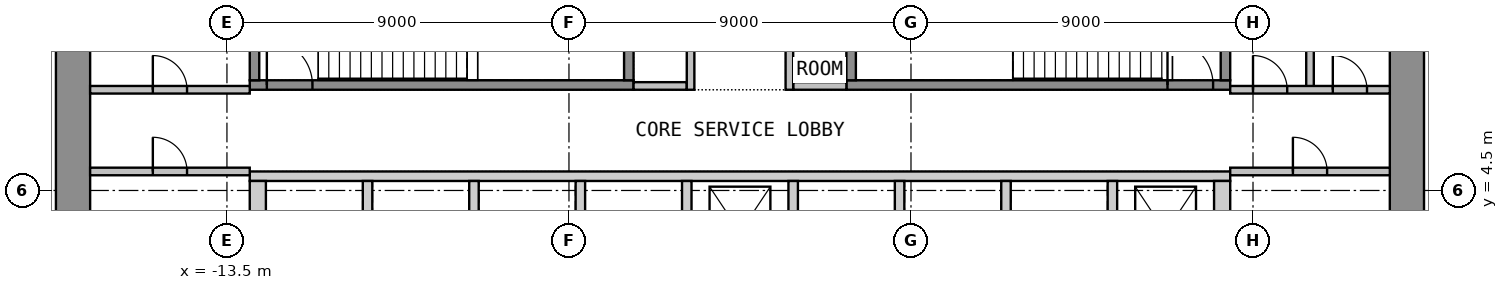
"""IFC4 building model, lengths in metres.
Left out: names, types, materials, properties, quantities, classifications, styles, units other than length and angle.
Written with IfcOpenShell. Run it as: python <this file> out.ifc"""

import sys

from ifc_helpers import new_model, si_unit, direction, frame, frame_2d, origin, place, context, subcontext, project, spatial, polyline, rectangle, outline, extrude, element, fill, save


model = new_model("IFC4")
c1 = context("Model", 3, precision=1e-05, world=origin(), true_north=direction((0.0, 1.0)))
c2 = subcontext(c1, "Body", "Model", "MODEL_VIEW")
j1 = project(units=[si_unit("LENGTHUNIT", "METRE"), si_unit("PLANEANGLEUNIT", "RADIAN")], contexts=[c1])
p1 = place(None, origin())
s1 = spatial("IfcSite", under=j1, at=p1, CompositionType="ELEMENT")
p2 = place(p1, origin())
s2 = spatial("IfcBuilding", under=s1, at=p2, CompositionType="ELEMENT")
p3 = place(p2, frame((0.0, 0.0, -5.0)))
s3 = spatial("IfcBuildingStorey", under=s2, at=p3, CompositionType="ELEMENT", Elevation=-5.0)
p4 = place(p3, frame((-17.55, -12.6, 0.0), z_axis=(0.0, 0.0, 1.0), x_axis=(0.0, 1.0, 0.0)))
e1 = element("IfcWall", 1, at=p4, inside=s3, PredefinedType="SHEAR", context=c2, shape_type="SweptSolid", body=[
    extrude(rectangle(XDim=25.2, YDim=0.9, at=frame_2d((12.6, 0.0))), origin(), (0.0, 0.0, 1.0), 4.55),
])
p5 = place(p4, frame((11.4, 0.0, 0.0)))
e2 = element("IfcOpeningElement", 2, at=p5, cuts=e1, PredefinedType="OPENING", context=c2, shape_type="SweptSolid", body=[
    extrude(rectangle(XDim=2.4, YDim=2.1, at=frame_2d((1.2, 1.05))), frame((0.0, 0.46, 0.0), z_axis=(0.0, -1.0, 0.0), x_axis=(1.0, 0.0, 0.0)), (0.0, 0.0, 1.0), 0.92),
])
p6 = place(p3, frame((17.55, -12.6, 0.0), z_axis=(0.0, 0.0, 1.0), x_axis=(0.0, 1.0, 0.0)))
e3 = element("IfcWall", 3, at=p6, inside=s3, PredefinedType="SHEAR", context=c2, shape_type="SweptSolid", body=[
    extrude(rectangle(XDim=25.2, YDim=0.9, at=frame_2d((12.6, 0.0))), origin(), (0.0, 0.0, 1.0), 4.55),
])
p7 = place(p6, frame((11.4, 0.0, 0.0)))
e4 = element("IfcOpeningElement", 4, at=p7, cuts=e3, PredefinedType="OPENING", context=c2, shape_type="SweptSolid", body=[
    extrude(rectangle(XDim=2.4, YDim=2.1, at=frame_2d((1.2, 1.05))), frame((0.0, 0.46, 0.0), z_axis=(0.0, -1.0, 0.0), x_axis=(1.0, 0.0, 0.0)), (0.0, 0.0, 1.0), 0.92),
])
p8 = place(p3, origin())
e5 = element("IfcWall", 5, at=p8, inside=s3, PredefinedType="SHEAR", context=c2, shape_type="SweptSolid", body=[
    extrude(outline(polyline([(-12.9, 4.75), (12.9, 4.75), (12.9, 5.0), (-12.9, 5.0), (-12.9, 4.75)])), origin(), (0.0, 0.0, 1.0), 4.55),
])
p9 = place(p3, origin())
e6 = element("IfcWall", 6, at=p9, inside=s3, PredefinedType="SHEAR", context=c2, shape_type="SweptSolid", body=[
    extrude(outline(polyline([(-12.9, 2.05), (-12.475, 2.05), (-12.475, 4.75), (-12.9, 4.75), (-12.9, 2.05)])), origin(), (0.0, 0.0, 1.0), 4.55),
])
p10 = place(p3, origin())
e7 = element("IfcWall", 7, at=p10, inside=s3, PredefinedType="SHEAR", context=c2, shape_type="SweptSolid", body=[
    extrude(outline(polyline([(-9.925, 2.05), (-9.675, 2.05), (-9.675, 4.75), (-9.925, 4.75), (-9.925, 2.05)])), origin(), (0.0, 0.0, 1.0), 4.55),
])
p11 = place(p3, origin())
e8 = element("IfcWall", 8, at=p11, inside=s3, PredefinedType="SHEAR", context=c2, shape_type="SweptSolid", body=[
    extrude(outline(polyline([(-7.125, 2.05), (-6.875, 2.05), (-6.875, 4.75), (-7.125, 4.75), (-7.125, 2.05)])), origin(), (0.0, 0.0, 1.0), 4.55),
])
p12 = place(p3, origin())
e9 = element("IfcWall", 9, at=p12, inside=s3, PredefinedType="SHEAR", context=c2, shape_type="SweptSolid", body=[
    extrude(outline(polyline([(-4.325, 2.05), (-4.075, 2.05), (-4.075, 4.75), (-4.325, 4.75), (-4.325, 2.05)])), origin(), (0.0, 0.0, 1.0), 4.55),
])
p13 = place(p3, origin())
e10 = element("IfcWall", 10, at=p13, inside=s3, PredefinedType="SHEAR", context=c2, shape_type="SweptSolid", body=[
    extrude(outline(polyline([(-1.525, 2.05), (-1.275, 2.05), (-1.275, 4.75), (-1.525, 4.75), (-1.525, 2.05)])), origin(), (0.0, 0.0, 1.0), 4.55),
])
p14 = place(p3, origin())
e11 = element("IfcWall", 11, at=p14, inside=s3, PredefinedType="SHEAR", context=c2, shape_type="SweptSolid", body=[
    extrude(outline(polyline([(1.275, 2.05), (1.525, 2.05), (1.525, 4.75), (1.275, 4.75), (1.275, 2.05)])), origin(), (0.0, 0.0, 1.0), 4.55),
])
p15 = place(p3, origin())
e12 = element("IfcWall", 12, at=p15, inside=s3, PredefinedType="SHEAR", context=c2, shape_type="SweptSolid", body=[
    extrude(outline(polyline([(4.075, 2.05), (4.325, 2.05), (4.325, 4.75), (4.075, 4.75), (4.075, 2.05)])), origin(), (0.0, 0.0, 1.0), 4.55),
])
p16 = place(p3, origin())
e13 = element("IfcWall", 13, at=p16, inside=s3, PredefinedType="SHEAR", context=c2, shape_type="SweptSolid", body=[
    extrude(outline(polyline([(6.875, 2.05), (7.125, 2.05), (7.125, 4.75), (6.875, 4.75), (6.875, 2.05)])), origin(), (0.0, 0.0, 1.0), 4.55),
])
p17 = place(p3, origin())
e14 = element("IfcWall", 14, at=p17, inside=s3, PredefinedType="SHEAR", context=c2, shape_type="SweptSolid", body=[
    extrude(outline(polyline([(9.675, 2.05), (9.925, 2.05), (9.925, 4.75), (9.675, 4.75), (9.675, 2.05)])), origin(), (0.0, 0.0, 1.0), 4.55),
])
p18 = place(p3, origin())
e15 = element("IfcWall", 15, at=p18, inside=s3, PredefinedType="SHEAR", context=c2, shape_type="SweptSolid", body=[
    extrude(outline(polyline([(12.475, 2.05), (12.9, 2.05), (12.9, 4.75), (12.475, 4.75), (12.475, 2.05)])), origin(), (0.0, 0.0, 1.0), 4.55),
])
p19 = place(p3, frame((-12.9, 7.275, 0.0), z_axis=(0.0, 0.0, 1.0), x_axis=(1.0, 0.0, 0.0)))
e16 = element("IfcWall", 16, at=p19, inside=s3, PredefinedType="SHEAR", context=c2, shape_type="SweptSolid", body=[
    extrude(rectangle(XDim=10.1, YDim=0.25, at=frame_2d((5.05, 0.0))), origin(), (0.0, 0.0, 1.0), 4.55),
])
p20 = place(p19, frame((0.45, 0.0, 0.0)))
e17 = element("IfcOpeningElement", 17, at=p20, cuts=e16, PredefinedType="OPENING", context=c2, shape_type="SweptSolid", body=[
    extrude(rectangle(XDim=1.2, YDim=2.1, at=frame_2d((0.6, 1.05))), frame((0.0, 0.135, 0.0), z_axis=(0.0, -1.0, 0.0), x_axis=(1.0, 0.0, 0.0)), (0.0, 0.0, 1.0), 0.27),
])
for number, where, z_axis, x_axis in (
    (18, (-12.775, 7.4, 0.0), (0.0, 0.0, 1.0), (0.0, 1.0, 0.0)),
    (19, (-2.925, 7.4, 0.0), (0.0, 0.0, 1.0), (0.0, 1.0, 0.0)),
):
    element("IfcWall", number, at=place(p3, frame(where, z_axis=z_axis, x_axis=x_axis)), inside=s3, PredefinedType="SHEAR", context=c2, shape_type="SweptSolid", body=[
        extrude(rectangle(XDim=3.25, YDim=0.25, at=frame_2d((1.625, 0.0))), origin(), (0.0, 0.0, 1.0), 4.55),
    ])
p21 = place(p3, frame((2.8, 7.275, 0.0), z_axis=(0.0, 0.0, 1.0), x_axis=(1.0, 0.0, 0.0)))
e20 = element("IfcWall", 20, at=p21, inside=s3, PredefinedType="SHEAR", context=c2, shape_type="SweptSolid", body=[
    extrude(rectangle(XDim=10.1, YDim=0.25, at=frame_2d((5.05, 0.0))), origin(), (0.0, 0.0, 1.0), 4.55),
])
p22 = place(p21, frame((8.45, 0.0, 0.0)))
e21 = element("IfcOpeningElement", 21, at=p22, cuts=e20, PredefinedType="OPENING", context=c2, shape_type="SweptSolid", body=[
    extrude(rectangle(XDim=1.2, YDim=2.1, at=frame_2d((0.6, 1.05))), frame((0.0, 0.135, 0.0), z_axis=(0.0, -1.0, 0.0), x_axis=(1.0, 0.0, 0.0)), (0.0, 0.0, 1.0), 0.27),
])
for number, where, z_axis, x_axis in (
    (22, (2.925, 7.4, 0.0), (0.0, 0.0, 1.0), (0.0, 1.0, 0.0)),
    (23, (12.775, 7.4, 0.0), (0.0, 0.0, 1.0), (0.0, 1.0, 0.0)),
):
    element("IfcWall", number, at=place(p3, frame(where, z_axis=z_axis, x_axis=x_axis)), inside=s3, PredefinedType="SHEAR", context=c2, shape_type="SweptSolid", body=[
        extrude(rectangle(XDim=3.25, YDim=0.25, at=frame_2d((1.625, 0.0))), origin(), (0.0, 0.0, 1.0), 4.55),
    ])
for number, where, z_axis, x_axis in (
    (24, (-2.8, 7.25, 0.0), (0.0, 0.0, 1.0), (1.0, 0.0, 0.0)),
    (25, (1.4, 7.25, 0.0), (0.0, 0.0, 1.0), (1.0, 0.0, 0.0)),
):
    element("IfcWall", number, at=place(p3, frame(where, z_axis=z_axis, x_axis=x_axis)), inside=s3, PredefinedType="PARTITIONING", context=c2, shape_type="SweptSolid", body=[
        extrude(rectangle(XDim=1.4, YDim=0.2, at=frame_2d((0.7, 0.0))), origin(), (0.0, 0.0, 1.0), 4.55),
    ])
p23 = place(p3, frame((-1.3, 7.15, 0.0), z_axis=(0.0, 0.0, 1.0), x_axis=(0.0, 1.0, 0.0)))
e26 = element("IfcWall", 26, at=p23, inside=s3, PredefinedType="PARTITIONING", context=c2, shape_type="SweptSolid", body=[
    extrude(rectangle(XDim=5.45, YDim=0.2, at=frame_2d((2.725, 0.0))), origin(), (0.0, 0.0, 1.0), 4.55),
])
p24 = place(p23, frame((2.375, 0.0, 0.0)))
e27 = element("IfcOpeningElement", 27, at=p24, cuts=e26, PredefinedType="OPENING", context=c2, shape_type="SweptSolid", body=[
    extrude(rectangle(XDim=0.9, YDim=2.1, at=frame_2d((0.45, 1.05))), frame((0.0, 0.11, 0.0), z_axis=(0.0, -1.0, 0.0), x_axis=(1.0, 0.0, 0.0)), (0.0, 0.0, 1.0), 0.22),
])
p25 = place(p3, frame((1.3, 7.15, 0.0), z_axis=(0.0, 0.0, 1.0), x_axis=(0.0, 1.0, 0.0)))
e28 = element("IfcWall", 28, at=p25, inside=s3, PredefinedType="PARTITIONING", context=c2, shape_type="SweptSolid", body=[
    extrude(rectangle(XDim=5.45, YDim=0.2, at=frame_2d((2.725, 0.0))), origin(), (0.0, 0.0, 1.0), 4.55),
])
p26 = place(p25, frame((1.062, 0.0, 0.0)))
e29 = element("IfcOpeningElement", 29, at=p26, cuts=e28, PredefinedType="OPENING", context=c2, shape_type="SweptSolid", body=[
    extrude(rectangle(XDim=0.9, YDim=2.1, at=frame_2d((0.45, 1.05))), frame((0.0, 0.11, 0.0), z_axis=(0.0, -1.0, 0.0), x_axis=(1.0, 0.0, 0.0)), (0.0, 0.0, 1.0), 0.22),
])
p27 = place(p25, frame((3.688, 0.0, 0.0)))
e30 = element("IfcOpeningElement", 30, at=p27, cuts=e28, PredefinedType="OPENING", context=c2, shape_type="SweptSolid", body=[
    extrude(rectangle(XDim=0.9, YDim=2.1, at=frame_2d((0.45, 1.05))), frame((0.0, 0.11, 0.0), z_axis=(0.0, -1.0, 0.0), x_axis=(1.0, 0.0, 0.0)), (0.0, 0.0, 1.0), 0.22),
])
p28 = place(p3, frame((-17.1, 7.15, 0.0), z_axis=(0.0, 0.0, 1.0), x_axis=(1.0, 0.0, 0.0)))
e31 = element("IfcWall", 31, at=p28, inside=s3, PredefinedType="PARTITIONING", context=c2, shape_type="SweptSolid", body=[
    extrude(rectangle(XDim=4.2, YDim=0.2, at=frame_2d((2.1, 0.0))), origin(), (0.0, 0.0, 1.0), 4.55),
])
p29 = place(p28, frame((1.65, 0.0, 0.0)))
e32 = element("IfcOpeningElement", 32, at=p29, cuts=e31, PredefinedType="OPENING", context=c2, shape_type="SweptSolid", body=[
    extrude(rectangle(XDim=0.9, YDim=2.1, at=frame_2d((0.45, 1.05))), frame((0.0, 0.11, 0.0), z_axis=(0.0, -1.0, 0.0), x_axis=(1.0, 0.0, 0.0)), (0.0, 0.0, 1.0), 0.22),
])
p30 = place(p3, frame((-17.1, 5.0, 0.0), z_axis=(0.0, 0.0, 1.0), x_axis=(1.0, 0.0, 0.0)))
e33 = element("IfcWall", 33, at=p30, inside=s3, PredefinedType="PARTITIONING", context=c2, shape_type="SweptSolid", body=[
    extrude(rectangle(XDim=4.2, YDim=0.2, at=frame_2d((2.1, 0.0))), origin(), (0.0, 0.0, 1.0), 4.55),
])
p31 = place(p30, frame((1.65, 0.0, 0.0)))
e34 = element("IfcOpeningElement", 34, at=p31, cuts=e33, PredefinedType="OPENING", context=c2, shape_type="SweptSolid", body=[
    extrude(rectangle(XDim=0.9, YDim=2.1, at=frame_2d((0.45, 1.05))), frame((0.0, 0.11, 0.0), z_axis=(0.0, -1.0, 0.0), x_axis=(1.0, 0.0, 0.0)), (0.0, 0.0, 1.0), 0.22),
])
p32 = place(p3, frame((15.0, 7.15, 0.0), z_axis=(0.0, 0.0, 1.0), x_axis=(0.0, 1.0, 0.0)))
e35 = element("IfcWall", 35, at=p32, inside=s3, PredefinedType="PARTITIONING", context=c2, shape_type="SweptSolid", body=[
    extrude(rectangle(XDim=5.45, YDim=0.2, at=frame_2d((2.725, 0.0))), origin(), (0.0, 0.0, 1.0), 4.55),
])
p33 = place(p3, frame((12.9, 7.15, 0.0), z_axis=(0.0, 0.0, 1.0), x_axis=(1.0, 0.0, 0.0)))
e36 = element("IfcWall", 36, at=p33, inside=s3, PredefinedType="PARTITIONING", context=c2, shape_type="SweptSolid", body=[
    extrude(rectangle(XDim=4.2, YDim=0.2, at=frame_2d((2.1, 0.0))), origin(), (0.0, 0.0, 1.0), 4.55),
])
p34 = place(p33, frame((0.6, 0.0, 0.0)))
e37 = element("IfcOpeningElement", 37, at=p34, cuts=e36, PredefinedType="OPENING", context=c2, shape_type="SweptSolid", body=[
    extrude(rectangle(XDim=0.9, YDim=2.1, at=frame_2d((0.45, 1.05))), frame((0.0, 0.11, 0.0), z_axis=(0.0, -1.0, 0.0), x_axis=(1.0, 0.0, 0.0)), (0.0, 0.0, 1.0), 0.22),
])
p35 = place(p33, frame((2.7, 0.0, 0.0)))
e38 = element("IfcOpeningElement", 38, at=p35, cuts=e36, PredefinedType="OPENING", context=c2, shape_type="SweptSolid", body=[
    extrude(rectangle(XDim=0.9, YDim=2.1, at=frame_2d((0.45, 1.05))), frame((0.0, 0.11, 0.0), z_axis=(0.0, -1.0, 0.0), x_axis=(1.0, 0.0, 0.0)), (0.0, 0.0, 1.0), 0.22),
])
p36 = place(p3, frame((12.9, 5.0, 0.0), z_axis=(0.0, 0.0, 1.0), x_axis=(1.0, 0.0, 0.0)))
e39 = element("IfcWall", 39, at=p36, inside=s3, PredefinedType="PARTITIONING", context=c2, shape_type="SweptSolid", body=[
    extrude(rectangle(XDim=4.2, YDim=0.2, at=frame_2d((2.1, 0.0))), origin(), (0.0, 0.0, 1.0), 4.55),
])
p37 = place(p36, frame((1.65, 0.0, 0.0)))
e40 = element("IfcOpeningElement", 40, at=p37, cuts=e39, PredefinedType="OPENING", context=c2, shape_type="SweptSolid", body=[
    extrude(rectangle(XDim=0.9, YDim=2.1, at=frame_2d((0.45, 1.05))), frame((0.0, 0.11, 0.0), z_axis=(0.0, -1.0, 0.0), x_axis=(1.0, 0.0, 0.0)), (0.0, 0.0, 1.0), 0.22),
])
p38 = place(p20, origin())
e41 = element("IfcDoor", 41, at=p38, inside=s3, OperationType="SINGLE_SWING_LEFT", PredefinedType="DOOR", context=c2, shape_type="SweptSolid", body=[
    extrude(rectangle(XDim=1.2, YDim=2.1, at=frame_2d((0.6, 1.05))), frame((0.0, 0.025, 0.0), z_axis=(0.0, -1.0, 0.0), x_axis=(1.0, 0.0, 0.0)), (0.0, 0.0, 1.0), 0.05),
])
fill(e17, e41)
p39 = place(p22, origin())
e42 = element("IfcDoor", 42, at=p39, inside=s3, OperationType="SINGLE_SWING_LEFT", PredefinedType="DOOR", context=c2, shape_type="SweptSolid", body=[
    extrude(rectangle(XDim=1.2, YDim=2.1, at=frame_2d((0.6, 1.05))), frame((0.0, 0.025, 0.0), z_axis=(0.0, -1.0, 0.0), x_axis=(1.0, 0.0, 0.0)), (0.0, 0.0, 1.0), 0.05),
])
fill(e21, e42)
p40 = place(p29, origin())
e43 = element("IfcDoor", 43, at=p40, inside=s3, OperationType="SINGLE_SWING_LEFT", PredefinedType="DOOR", context=c2, shape_type="SweptSolid", body=[
    extrude(rectangle(XDim=0.9, YDim=2.1, at=frame_2d((0.45, 1.05))), frame((0.0, 0.025, 0.0), z_axis=(0.0, -1.0, 0.0), x_axis=(1.0, 0.0, 0.0)), (0.0, 0.0, 1.0), 0.05),
])
fill(e32, e43)
p41 = place(p31, origin())
e44 = element("IfcDoor", 44, at=p41, inside=s3, OperationType="SINGLE_SWING_LEFT", PredefinedType="DOOR", context=c2, shape_type="SweptSolid", body=[
    extrude(rectangle(XDim=0.9, YDim=2.1, at=frame_2d((0.45, 1.05))), frame((0.0, 0.025, 0.0), z_axis=(0.0, -1.0, 0.0), x_axis=(1.0, 0.0, 0.0)), (0.0, 0.0, 1.0), 0.05),
])
fill(e34, e44)
p42 = place(p34, origin())
e45 = element("IfcDoor", 45, at=p42, inside=s3, OperationType="SINGLE_SWING_LEFT", PredefinedType="DOOR", context=c2, shape_type="SweptSolid", body=[
    extrude(rectangle(XDim=0.9, YDim=2.1, at=frame_2d((0.45, 1.05))), frame((0.0, 0.025, 0.0), z_axis=(0.0, -1.0, 0.0), x_axis=(1.0, 0.0, 0.0)), (0.0, 0.0, 1.0), 0.05),
])
fill(e37, e45)
p43 = place(p35, origin())
e46 = element("IfcDoor", 46, at=p43, inside=s3, OperationType="SINGLE_SWING_LEFT", PredefinedType="DOOR", context=c2, shape_type="SweptSolid", body=[
    extrude(rectangle(XDim=0.9, YDim=2.1, at=frame_2d((0.45, 1.05))), frame((0.0, 0.025, 0.0), z_axis=(0.0, -1.0, 0.0), x_axis=(1.0, 0.0, 0.0)), (0.0, 0.0, 1.0), 0.05),
])
fill(e38, e46)
p44 = place(p37, origin())
e47 = element("IfcDoor", 47, at=p44, inside=s3, OperationType="SINGLE_SWING_LEFT", PredefinedType="DOOR", context=c2, shape_type="SweptSolid", body=[
    extrude(rectangle(XDim=0.9, YDim=2.1, at=frame_2d((0.45, 1.05))), frame((0.0, 0.025, 0.0), z_axis=(0.0, -1.0, 0.0), x_axis=(1.0, 0.0, 0.0)), (0.0, 0.0, 1.0), 0.05),
])
fill(e40, e47)
save(model, sys.argv[1])
